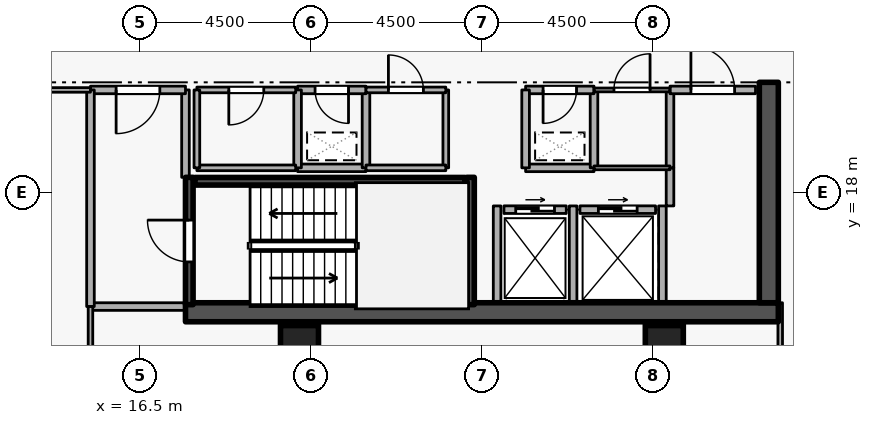
"""IFC4 building model, lengths in metres.
Left out: names, types, materials, properties, quantities, classifications, styles, units other than length and angle.
Written with IfcOpenShell. Run it as: python <this file> out.ifc"""

import sys

from ifc_helpers import new_model, si_unit, direction, frame, frame_2d, origin, origin_2d, place, context, subcontext, project, spatial, rectangle, extrude, element, fill, save


model = new_model("IFC4")
c1 = context("Model", 3, precision=1e-05, world=origin(), true_north=direction((0.0, 1.0)))
c2 = subcontext(c1, "Body", "Model", "MODEL_VIEW")
j1 = project(units=[si_unit("LENGTHUNIT", "METRE"), si_unit("PLANEANGLEUNIT", "RADIAN")], contexts=[c1])
p1 = place(None, origin())
s1 = spatial("IfcSite", under=j1, at=p1, CompositionType="ELEMENT")
p2 = place(p1, origin())
s2 = spatial("IfcBuilding", under=s1, at=p2, CompositionType="ELEMENT")
p3 = place(p2, frame((0.0, 0.0, 236.7)))
s3 = spatial("IfcBuildingStorey", under=s2, at=p3, CompositionType="ELEMENT", Elevation=236.7)
p4 = place(p3, frame((17.7, 14.85, 0.0), z_axis=(0.0, 0.0, 1.0), x_axis=(1.0, 0.0, 0.0)))
e1 = element("IfcWall", 1, at=p4, inside=s3, PredefinedType="SHEAR", context=c2, shape_type="SweptSolid", body=[
    extrude(rectangle(XDim=15.6, YDim=0.5, at=frame_2d((7.8, 0.0))), origin(), (0.0, 0.0, 1.0), 3.6),
])
p5 = place(p3, frame((33.05, 15.1, 0.0), z_axis=(0.0, 0.0, 1.0), x_axis=(0.0, 1.0, 0.0)))
e2 = element("IfcWall", 2, at=p5, inside=s3, PredefinedType="SHEAR", context=c2, shape_type="SweptSolid", body=[
    extrude(rectangle(XDim=5.8, YDim=0.5, at=frame_2d((2.9, 0.0))), origin(), (0.0, 0.0, 1.0), 3.6),
])
for number, where, z_axis, x_axis in (
    (3, (20.7, 14.0, 0.0), (0.0, 0.0, 1.0), (1.0, 0.0, 0.0)),
    (4, (30.3, 14.0, 0.0), (0.0, 0.0, 1.0), (1.0, 0.0, 0.0)),
):
    element("IfcColumn", number, at=place(p3, frame(where, z_axis=z_axis, x_axis=x_axis)), inside=s3, PredefinedType="COLUMN", context=c2, shape_type="SweptSolid", body=[
        extrude(rectangle(XDim=1.0, YDim=1.0, at=origin_2d()), origin(), (0.0, 0.0, 1.0), 3.6),
    ])
p6 = place(p3, frame((26.08, 17.55, 0.0), z_axis=(0.0, 0.0, 1.0), x_axis=(1.0, 0.0, 0.0)))
e5 = element("IfcWall", 5, at=p6, inside=s3, PredefinedType="STANDARD", context=c2, shape_type="SweptSolid", body=[
    extrude(rectangle(XDim=1.64, YDim=0.2, at=frame_2d((0.82, 0.0))), origin(), (0.0, 0.0, 1.0), 3.34),
])
p7 = place(p6, frame((0.31, 0.0, 0.0)))
e6 = element("IfcOpeningElement", 6, at=p7, cuts=e5, PredefinedType="OPENING", context=c2, shape_type="SweptSolid", body=[
    extrude(rectangle(XDim=1.02, YDim=2.06, at=frame_2d((0.51, 1.03))), frame((0.0, 0.11, 0.0), z_axis=(0.0, -1.0, 0.0), x_axis=(1.0, 0.0, 0.0)), (0.0, 0.0, 1.0), 0.22),
])
p8 = place(p3, frame((28.08, 17.55, 0.0), z_axis=(0.0, 0.0, 1.0), x_axis=(1.0, 0.0, 0.0)))
e7 = element("IfcWall", 7, at=p8, inside=s3, PredefinedType="STANDARD", context=c2, shape_type="SweptSolid", body=[
    extrude(rectangle(XDim=1.99, YDim=0.2, at=frame_2d((0.995, 0.0))), origin(), (0.0, 0.0, 1.0), 3.34),
])
p9 = place(p8, frame((0.485, 0.0, 0.0)))
e8 = element("IfcOpeningElement", 8, at=p9, cuts=e7, PredefinedType="OPENING", context=c2, shape_type="SweptSolid", body=[
    extrude(rectangle(XDim=1.02, YDim=2.06, at=frame_2d((0.51, 1.03))), frame((0.0, 0.11, 0.0), z_axis=(0.0, -1.0, 0.0), x_axis=(1.0, 0.0, 0.0)), (0.0, 0.0, 1.0), 0.22),
])
for number, where, z_axis, x_axis in (
    (9, (27.9, 15.112, 0.0), (0.0, 0.0, 1.0), (0.0, 1.0, 0.0)),
    (10, (25.9, 15.112, 0.0), (0.0, 0.0, 1.0), (0.0, 1.0, 0.0)),
    (11, (30.25, 15.112, 0.0), (0.0, 0.0, 1.0), (0.0, 1.0, 0.0)),
):
    element("IfcWall", number, at=place(p3, frame(where, z_axis=z_axis, x_axis=x_axis)), inside=s3, PredefinedType="STANDARD", context=c2, shape_type="SweptSolid", body=[
        extrude(rectangle(XDim=2.536, YDim=0.2, at=frame_2d((1.268, 0.0))), origin(), (0.0, 0.0, 1.0), 3.34),
    ])
p10 = place(p3, frame((17.8, 15.05, 0.0), z_axis=(0.0, 0.0, 1.0), x_axis=(0.0, 1.0, 0.0)))
e12 = element("IfcWall", 12, at=p10, inside=s3, PredefinedType="SHEAR", context=c2, shape_type="SweptSolid", body=[
    extrude(rectangle(XDim=3.35, YDim=0.2, at=frame_2d((1.675, 0.0))), origin(), (0.0, 0.0, 1.0), 3.6),
])
p11 = place(p10, frame((1.125, 0.0, 0.0)))
e13 = element("IfcOpeningElement", 13, at=p11, cuts=e12, PredefinedType="OPENING", context=c2, shape_type="SweptSolid", body=[
    extrude(rectangle(XDim=1.1, YDim=2.1, at=frame_2d((0.55, 1.05))), frame((0.0, 0.11, 0.0), z_axis=(0.0, -1.0, 0.0), x_axis=(1.0, 0.0, 0.0)), (0.0, 0.0, 1.0), 0.22),
])
p12 = place(p3, frame((25.2, 18.4, 0.0), z_axis=(0.0, 0.0, 1.0), x_axis=(0.0, -1.0, 0.0)))
e14 = element("IfcWall", 14, at=p12, inside=s3, PredefinedType="SHEAR", context=c2, shape_type="SweptSolid", body=[
    extrude(rectangle(XDim=3.35, YDim=0.2, at=frame_2d((1.675, 0.0))), origin(), (0.0, 0.0, 1.0), 3.6),
])
p13 = place(p3, frame((25.05, 18.297, 0.0), z_axis=(0.0, 0.0, 1.0), x_axis=(-1.0, 0.0, 0.0)))
e15 = element("IfcWall", 15, at=p13, inside=s3, PredefinedType="SHEAR", context=c2, shape_type="SweptSolid", body=[
    extrude(rectangle(XDim=7.1, YDim=0.2, at=frame_2d((3.55, 0.0))), origin(), (0.0, 0.0, 1.0), 3.6),
])
p14 = place(p3, frame((15.2, 15.0, 0.0), z_axis=(0.0, 0.0, 1.0), x_axis=(1.0, 0.0, 0.0)))
e16 = element("IfcWall", 16, at=p14, inside=s3, PredefinedType="STANDARD", context=c2, shape_type="SweptSolid", body=[
    extrude(rectangle(XDim=2.5, YDim=0.2, at=frame_2d((1.25, 0.0))), origin(), (0.0, 0.0, 1.0), 3.34),
])
p15 = place(p3, frame((17.7, 18.4, 0.0), z_axis=(0.0, 0.0, 1.0), x_axis=(0.0, 1.0, 0.0)))
e17 = element("IfcWall", 17, at=p15, inside=s3, PredefinedType="STANDARD", context=c2, shape_type="SweptSolid", body=[
    extrude(rectangle(XDim=2.3, YDim=0.2, at=frame_2d((1.15, 0.0))), origin(), (0.0, 0.0, 1.0), 2.545),
])
p16 = place(p3, frame((17.7, 20.7, 0.0), z_axis=(0.0, 0.0, 1.0), x_axis=(-1.0, 0.0, 0.0)))
e18 = element("IfcWall", 18, at=p16, inside=s3, PredefinedType="STANDARD", context=c2, shape_type="SweptSolid", body=[
    extrude(rectangle(XDim=2.5, YDim=0.2, at=frame_2d((1.25, 0.0))), origin(), (0.0, 0.0, 1.0), 3.34),
])
p17 = place(p16, frame((0.675, 0.0, 0.0)))
e19 = element("IfcOpeningElement", 19, at=p17, cuts=e18, PredefinedType="OPENING", context=c2, shape_type="SweptSolid", body=[
    extrude(rectangle(XDim=1.15, YDim=2.1, at=frame_2d((0.575, 1.05))), frame((0.0, 0.11, 0.0), z_axis=(0.0, -1.0, 0.0), x_axis=(1.0, 0.0, 0.0)), (0.0, 0.0, 1.0), 0.22),
])
p18 = place(p3, frame((15.2, 20.7, 0.0), z_axis=(0.0, 0.0, 1.0), x_axis=(0.0, -1.0, 0.0)))
e20 = element("IfcWall", 20, at=p18, inside=s3, PredefinedType="STANDARD", context=c2, shape_type="SweptSolid", body=[
    extrude(rectangle(XDim=5.7, YDim=0.2, at=frame_2d((2.85, 0.0))), origin(), (0.0, 0.0, 1.0), 3.34),
])
p19 = place(p3, frame((26.65, 18.65, 0.0), z_axis=(0.0, 0.0, 1.0), x_axis=(1.0, 0.0, 0.0)))
e21 = element("IfcWall", 21, at=p19, inside=s3, PredefinedType="STANDARD", context=c2, shape_type="SweptSolid", body=[
    extrude(rectangle(XDim=1.8, YDim=0.2, at=frame_2d((0.9, 0.0))), origin(), (0.0, 0.0, 1.0), 3.34),
])
p20 = place(p3, frame((28.45, 18.65, 0.0), z_axis=(0.0, 0.0, 1.0), x_axis=(0.0, 1.0, 0.0)))
e22 = element("IfcWall", 22, at=p20, inside=s3, PredefinedType="STANDARD", context=c2, shape_type="SweptSolid", body=[
    extrude(rectangle(XDim=2.05, YDim=0.2, at=frame_2d((1.025, 0.0))), origin(), (0.0, 0.0, 1.0), 3.34),
])
p21 = place(p3, frame((28.45, 20.7, 0.0), z_axis=(0.0, 0.0, 1.0), x_axis=(-1.0, 0.0, 0.0)))
e23 = element("IfcWall", 23, at=p21, inside=s3, PredefinedType="STANDARD", context=c2, shape_type="SweptSolid", body=[
    extrude(rectangle(XDim=1.8, YDim=0.2, at=frame_2d((0.9, 0.0))), origin(), (0.0, 0.0, 1.0), 3.34),
])
p22 = place(p21, frame((0.46, 0.0, 0.0)))
e24 = element("IfcOpeningElement", 24, at=p22, cuts=e23, PredefinedType="OPENING", context=c2, shape_type="SweptSolid", body=[
    extrude(rectangle(XDim=0.88, YDim=2.04, at=frame_2d((0.44, 1.02))), frame((0.0, 0.11, 0.0), z_axis=(0.0, -1.0, 0.0), x_axis=(1.0, 0.0, 0.0)), (0.0, 0.0, 1.0), 0.22),
])
p23 = place(p3, frame((26.65, 20.7, 0.0), z_axis=(0.0, 0.0, 1.0), x_axis=(0.0, -1.0, 0.0)))
e25 = element("IfcWall", 25, at=p23, inside=s3, PredefinedType="STANDARD", context=c2, shape_type="SweptSolid", body=[
    extrude(rectangle(XDim=2.05, YDim=0.2, at=frame_2d((1.025, 0.0))), origin(), (0.0, 0.0, 1.0), 3.34),
])
p24 = place(p3, frame((20.65, 18.65, 0.0), z_axis=(0.0, 0.0, 1.0), x_axis=(1.0, 0.0, 0.0)))
e26 = element("IfcWall", 26, at=p24, inside=s3, PredefinedType="STANDARD", context=c2, shape_type="SweptSolid", body=[
    extrude(rectangle(XDim=1.8, YDim=0.2, at=frame_2d((0.9, 0.0))), origin(), (0.0, 0.0, 1.0), 3.34),
])
p25 = place(p3, frame((22.45, 18.65, 0.0), z_axis=(0.0, 0.0, 1.0), x_axis=(0.0, 1.0, 0.0)))
e27 = element("IfcWall", 27, at=p25, inside=s3, PredefinedType="STANDARD", context=c2, shape_type="SweptSolid", body=[
    extrude(rectangle(XDim=2.05, YDim=0.2, at=frame_2d((1.025, 0.0))), origin(), (0.0, 0.0, 1.0), 3.34),
])
p26 = place(p3, frame((22.45, 20.7, 0.0), z_axis=(0.0, 0.0, 1.0), x_axis=(-1.0, 0.0, 0.0)))
e28 = element("IfcWall", 28, at=p26, inside=s3, PredefinedType="STANDARD", context=c2, shape_type="SweptSolid", body=[
    extrude(rectangle(XDim=1.8, YDim=0.2, at=frame_2d((0.9, 0.0))), origin(), (0.0, 0.0, 1.0), 3.34),
])
p27 = place(p26, frame((0.46, 0.0, 0.0)))
e29 = element("IfcOpeningElement", 29, at=p27, cuts=e28, PredefinedType="OPENING", context=c2, shape_type="SweptSolid", body=[
    extrude(rectangle(XDim=0.88, YDim=2.04, at=frame_2d((0.44, 1.02))), frame((0.0, 0.11, 0.0), z_axis=(0.0, -1.0, 0.0), x_axis=(1.0, 0.0, 0.0)), (0.0, 0.0, 1.0), 0.22),
])
p28 = place(p3, frame((20.65, 20.7, 0.0), z_axis=(0.0, 0.0, 1.0), x_axis=(0.0, -1.0, 0.0)))
e30 = element("IfcWall", 30, at=p28, inside=s3, PredefinedType="STANDARD", context=c2, shape_type="SweptSolid", body=[
    extrude(rectangle(XDim=2.05, YDim=0.2, at=frame_2d((1.025, 0.0))), origin(), (0.0, 0.0, 1.0), 3.34),
])
p29 = place(p3, frame((30.45, 17.648, 0.0), z_axis=(0.0, 0.0, 1.0), x_axis=(0.0, 1.0, 0.0)))
e31 = element("IfcWall", 31, at=p29, inside=s3, PredefinedType="STANDARD", context=c2, shape_type="SweptSolid", body=[
    extrude(rectangle(XDim=1.002, YDim=0.2, at=frame_2d((0.501, 0.0))), origin(), (0.0, 0.0, 1.0), 3.34),
])
p30 = place(p3, frame((30.45, 18.65, 0.0), z_axis=(0.0, 0.0, 1.0), x_axis=(0.0, 1.0, 0.0)))
e32 = element("IfcWall", 32, at=p30, inside=s3, PredefinedType="STANDARD", context=c2, shape_type="SweptSolid", body=[
    extrude(rectangle(XDim=2.05, YDim=0.2, at=frame_2d((1.025, 0.0))), origin(), (0.0, 0.0, 1.0), 3.34),
])
p31 = place(p3, frame((30.45, 20.7, 0.0), z_axis=(0.0, 0.0, 1.0), x_axis=(1.0, 0.0, 0.0)))
e33 = element("IfcWall", 33, at=p31, inside=s3, PredefinedType="STANDARD", context=c2, shape_type="SweptSolid", body=[
    extrude(rectangle(XDim=2.25, YDim=0.2, at=frame_2d((1.125, 0.0))), origin(), (0.0, 0.0, 1.0), 3.34),
])
p32 = place(p31, frame((0.55, 0.0, 0.0)))
e34 = element("IfcOpeningElement", 34, at=p32, cuts=e33, PredefinedType="OPENING", context=c2, shape_type="SweptSolid", body=[
    extrude(rectangle(XDim=1.15, YDim=2.1, at=frame_2d((0.575, 1.05))), frame((0.0, 0.11, 0.0), z_axis=(0.0, -1.0, 0.0), x_axis=(1.0, 0.0, 0.0)), (0.0, 0.0, 1.0), 0.22),
])
p33 = place(p3, frame((18.0, 18.65, 0.0), z_axis=(0.0, 0.0, 1.0), x_axis=(1.0, 0.0, 0.0)))
e35 = element("IfcWall", 35, at=p33, inside=s3, PredefinedType="PARTITIONING", context=c2, shape_type="SweptSolid", body=[
    extrude(rectangle(XDim=2.6, YDim=0.15, at=frame_2d((1.3, 0.0))), origin(), (0.0, 0.0, 1.0), 3.34),
])
p34 = place(p3, frame((20.6, 20.7, 0.0), z_axis=(0.0, 0.0, 1.0), x_axis=(-1.0, 0.0, 0.0)))
e36 = element("IfcWall", 36, at=p34, inside=s3, PredefinedType="PARTITIONING", context=c2, shape_type="SweptSolid", body=[
    extrude(rectangle(XDim=2.6, YDim=0.15, at=frame_2d((1.3, 0.0))), origin(), (0.0, 0.0, 1.0), 3.34),
])
p35 = place(p34, frame((0.84, 0.0, 0.0)))
e37 = element("IfcOpeningElement", 37, at=p35, cuts=e36, PredefinedType="OPENING", context=c2, shape_type="SweptSolid", body=[
    extrude(rectangle(XDim=0.92, YDim=2.08, at=frame_2d((0.46, 1.04))), frame((0.0, 0.085, 0.0), z_axis=(0.0, -1.0, 0.0), x_axis=(1.0, 0.0, 0.0)), (0.0, 0.0, 1.0), 0.17),
])
p36 = place(p3, frame((18.0, 20.7, 0.0), z_axis=(0.0, 0.0, 1.0), x_axis=(0.0, -1.0, 0.0)))
e38 = element("IfcWall", 38, at=p36, inside=s3, PredefinedType="PARTITIONING", context=c2, shape_type="SweptSolid", body=[
    extrude(rectangle(XDim=2.05, YDim=0.15, at=frame_2d((1.025, 0.0))), origin(), (0.0, 0.0, 1.0), 2.545),
])
p37 = place(p3, frame((24.55, 20.7, 0.0), z_axis=(0.0, 0.0, 1.0), x_axis=(0.0, -1.0, 0.0)))
e39 = element("IfcWall", 39, at=p37, inside=s3, PredefinedType="PARTITIONING", context=c2, shape_type="SweptSolid", body=[
    extrude(rectangle(XDim=2.05, YDim=0.15, at=frame_2d((1.025, 0.0))), origin(), (0.0, 0.0, 1.0), 3.34),
])
p38 = place(p3, frame((24.55, 18.65, 0.0), z_axis=(0.0, 0.0, 1.0), x_axis=(-1.0, 0.0, 0.0)))
e40 = element("IfcWall", 40, at=p38, inside=s3, PredefinedType="PARTITIONING", context=c2, shape_type="SweptSolid", body=[
    extrude(rectangle(XDim=2.1, YDim=0.15, at=frame_2d((1.05, 0.0))), origin(), (0.0, 0.0, 1.0), 3.34),
])
p39 = place(p3, frame((22.45, 20.7, 0.0), z_axis=(0.0, 0.0, 1.0), x_axis=(1.0, 0.0, 0.0)))
e41 = element("IfcWall", 41, at=p39, inside=s3, PredefinedType="PARTITIONING", context=c2, shape_type="SweptSolid", body=[
    extrude(rectangle(XDim=2.1, YDim=0.15, at=frame_2d((1.05, 0.0))), origin(), (0.0, 0.0, 1.0), 3.34),
])
p40 = place(p39, frame((0.59, 0.0, 0.0)))
e42 = element("IfcOpeningElement", 42, at=p40, cuts=e41, PredefinedType="OPENING", context=c2, shape_type="SweptSolid", body=[
    extrude(rectangle(XDim=0.92, YDim=2.08, at=frame_2d((0.46, 1.04))), frame((0.0, 0.085, 0.0), z_axis=(0.0, -1.0, 0.0), x_axis=(1.0, 0.0, 0.0)), (0.0, 0.0, 1.0), 0.17),
])
p41 = place(p3, frame((30.45, 18.65, 0.0), z_axis=(0.0, 0.0, 1.0), x_axis=(-1.0, 0.0, 0.0)))
e43 = element("IfcWall", 43, at=p41, inside=s3, PredefinedType="PARTITIONING", context=c2, shape_type="SweptSolid", body=[
    extrude(rectangle(XDim=2.0, YDim=0.1, at=frame_2d((1.0, 0.0))), origin(), (0.0, 0.0, 1.0), 3.34),
])
p42 = place(p3, frame((28.45, 20.7, 0.0), z_axis=(0.0, 0.0, 1.0), x_axis=(1.0, 0.0, 0.0)))
e44 = element("IfcWall", 44, at=p42, inside=s3, PredefinedType="PARTITIONING", context=c2, shape_type="SweptSolid", body=[
    extrude(rectangle(XDim=2.0, YDim=0.1, at=frame_2d((1.0, 0.0))), origin(), (0.0, 0.0, 1.0), 3.34),
])
p43 = place(p42, frame((0.525, 0.0, 0.0)))
e45 = element("IfcOpeningElement", 45, at=p43, cuts=e44, PredefinedType="OPENING", context=c2, shape_type="SweptSolid", body=[
    extrude(rectangle(XDim=0.95, YDim=2.1, at=frame_2d((0.475, 1.05))), frame((0.0, 0.06, 0.0), z_axis=(0.0, -1.0, 0.0), x_axis=(1.0, 0.0, 0.0)), (0.0, 0.0, 1.0), 0.12),
])
p44 = place(p3, frame((33.35, 3.28, 0.0), z_axis=(0.0, 0.0, 1.0), x_axis=(0.0, 1.0, 0.0)))
e46 = element("IfcWall", 46, at=p44, inside=s3, PredefinedType="PARTITIONING", context=c2, shape_type="SweptSolid", body=[
    extrude(rectangle(XDim=11.82, YDim=0.12, at=frame_2d((5.91, 0.0))), origin(), (0.0, 0.0, 1.0), 2.545),
])
p45 = place(p3, frame((13.25, 20.7, 0.0), z_axis=(0.0, 0.0, 1.0), x_axis=(1.0, 0.0, 0.0)))
e47 = element("IfcWall", 47, at=p45, inside=s3, PredefinedType="PARTITIONING", context=c2, shape_type="SweptSolid", body=[
    extrude(rectangle(XDim=1.95, YDim=0.12, at=frame_2d((0.975, 0.0))), origin(), (0.0, 0.0, 1.0), 3.34),
])
p46 = place(p3, frame((15.2, 15.0, 0.0), z_axis=(0.0, 0.0, 1.0), x_axis=(0.0, -1.0, 0.0)))
e48 = element("IfcWall", 48, at=p46, inside=s3, PredefinedType="PARTITIONING", context=c2, shape_type="SweptSolid", body=[
    extrude(rectangle(XDim=11.72, YDim=0.12, at=frame_2d((5.86, 0.0))), origin(), (0.0, 0.0, 1.0), 3.34),
])
p47 = place(p7, origin())
e49 = element("IfcDoor", 49, at=p47, inside=s3, OperationType="SLIDING_TO_LEFT", PredefinedType="DOOR", context=c2, shape_type="SweptSolid", body=[
    extrude(rectangle(XDim=1.02, YDim=2.06, at=frame_2d((0.51, 1.03))), frame((0.0, 0.025, 0.0), z_axis=(0.0, -1.0, 0.0), x_axis=(1.0, 0.0, 0.0)), (0.0, 0.0, 1.0), 0.05),
])
fill(e6, e49)
p48 = place(p9, origin())
e50 = element("IfcDoor", 50, at=p48, inside=s3, OperationType="SLIDING_TO_LEFT", PredefinedType="DOOR", context=c2, shape_type="SweptSolid", body=[
    extrude(rectangle(XDim=1.02, YDim=2.06, at=frame_2d((0.51, 1.03))), frame((0.0, 0.025, 0.0), z_axis=(0.0, -1.0, 0.0), x_axis=(1.0, 0.0, 0.0)), (0.0, 0.0, 1.0), 0.05),
])
fill(e8, e50)
p49 = place(p11, origin())
e51 = element("IfcDoor", 51, at=p49, inside=s3, OperationType="SINGLE_SWING_RIGHT", PredefinedType="DOOR", context=c2, shape_type="SweptSolid", body=[
    extrude(rectangle(XDim=1.1, YDim=2.1, at=frame_2d((0.55, 1.05))), frame((0.0, 0.025, 0.0), z_axis=(0.0, -1.0, 0.0), x_axis=(1.0, 0.0, 0.0)), (0.0, 0.0, 1.0), 0.05),
])
fill(e13, e51)
p50 = place(p17, origin())
e52 = element("IfcDoor", 52, at=p50, inside=s3, OperationType="SINGLE_SWING_RIGHT", PredefinedType="DOOR", context=c2, shape_type="SweptSolid", body=[
    extrude(rectangle(XDim=1.15, YDim=2.1, at=frame_2d((0.575, 1.05))), frame((0.0, 0.025, 0.0), z_axis=(0.0, -1.0, 0.0), x_axis=(1.0, 0.0, 0.0)), (0.0, 0.0, 1.0), 0.05),
])
fill(e19, e52)
p51 = place(p22, origin())
e53 = element("IfcDoor", 53, at=p51, inside=s3, OperationType="SINGLE_SWING_RIGHT", PredefinedType="DOOR", context=c2, shape_type="SweptSolid", body=[
    extrude(rectangle(XDim=0.88, YDim=2.04, at=frame_2d((0.44, 1.02))), frame((0.0, 0.025, 0.0), z_axis=(0.0, -1.0, 0.0), x_axis=(1.0, 0.0, 0.0)), (0.0, 0.0, 1.0), 0.05),
])
fill(e24, e53)
p52 = place(p27, origin())
e54 = element("IfcDoor", 54, at=p52, inside=s3, OperationType="SINGLE_SWING_LEFT", PredefinedType="DOOR", context=c2, shape_type="SweptSolid", body=[
    extrude(rectangle(XDim=0.88, YDim=2.04, at=frame_2d((0.44, 1.02))), frame((0.0, 0.025, 0.0), z_axis=(0.0, -1.0, 0.0), x_axis=(1.0, 0.0, 0.0)), (0.0, 0.0, 1.0), 0.05),
])
fill(e29, e54)
p53 = place(p35, origin())
e55 = element("IfcDoor", 55, at=p53, inside=s3, OperationType="SINGLE_SWING_RIGHT", PredefinedType="DOOR", context=c2, shape_type="SweptSolid", body=[
    extrude(rectangle(XDim=0.92, YDim=2.08, at=frame_2d((0.46, 1.04))), frame((0.0, 0.025, 0.0), z_axis=(0.0, -1.0, 0.0), x_axis=(1.0, 0.0, 0.0)), (0.0, 0.0, 1.0), 0.05),
])
fill(e37, e55)
p54 = place(p40, origin())
e56 = element("IfcDoor", 56, at=p54, inside=s3, OperationType="SINGLE_SWING_LEFT", PredefinedType="DOOR", context=c2, shape_type="SweptSolid", body=[
    extrude(rectangle(XDim=0.92, YDim=2.08, at=frame_2d((0.46, 1.04))), frame((0.0, 0.025, 0.0), z_axis=(0.0, -1.0, 0.0), x_axis=(1.0, 0.0, 0.0)), (0.0, 0.0, 1.0), 0.05),
])
fill(e42, e56)
p55 = place(p43, origin())
e57 = element("IfcDoor", 57, at=p55, inside=s3, OperationType="SINGLE_SWING_RIGHT", PredefinedType="DOOR", context=c2, shape_type="SweptSolid", body=[
    extrude(rectangle(XDim=0.95, YDim=2.1, at=frame_2d((0.475, 1.05))), frame((0.0, 0.025, 0.0), z_axis=(0.0, -1.0, 0.0), x_axis=(1.0, 0.0, 0.0)), (0.0, 0.0, 1.0), 0.05),
])
fill(e45, e57)
p56 = place(p32, origin())
e58 = element("IfcDoor", 58, at=p56, inside=s3, OperationType="SINGLE_SWING_LEFT", PredefinedType="DOOR", context=c2, shape_type="SweptSolid", body=[
    extrude(rectangle(XDim=1.15, YDim=2.1, at=frame_2d((0.575, 1.05))), frame((0.0, 0.025, 0.0), z_axis=(0.0, -1.0, 0.0), x_axis=(1.0, 0.0, 0.0)), (0.0, 0.0, 1.0), 0.05),
])
fill(e34, e58)
save(model, sys.argv[1])
